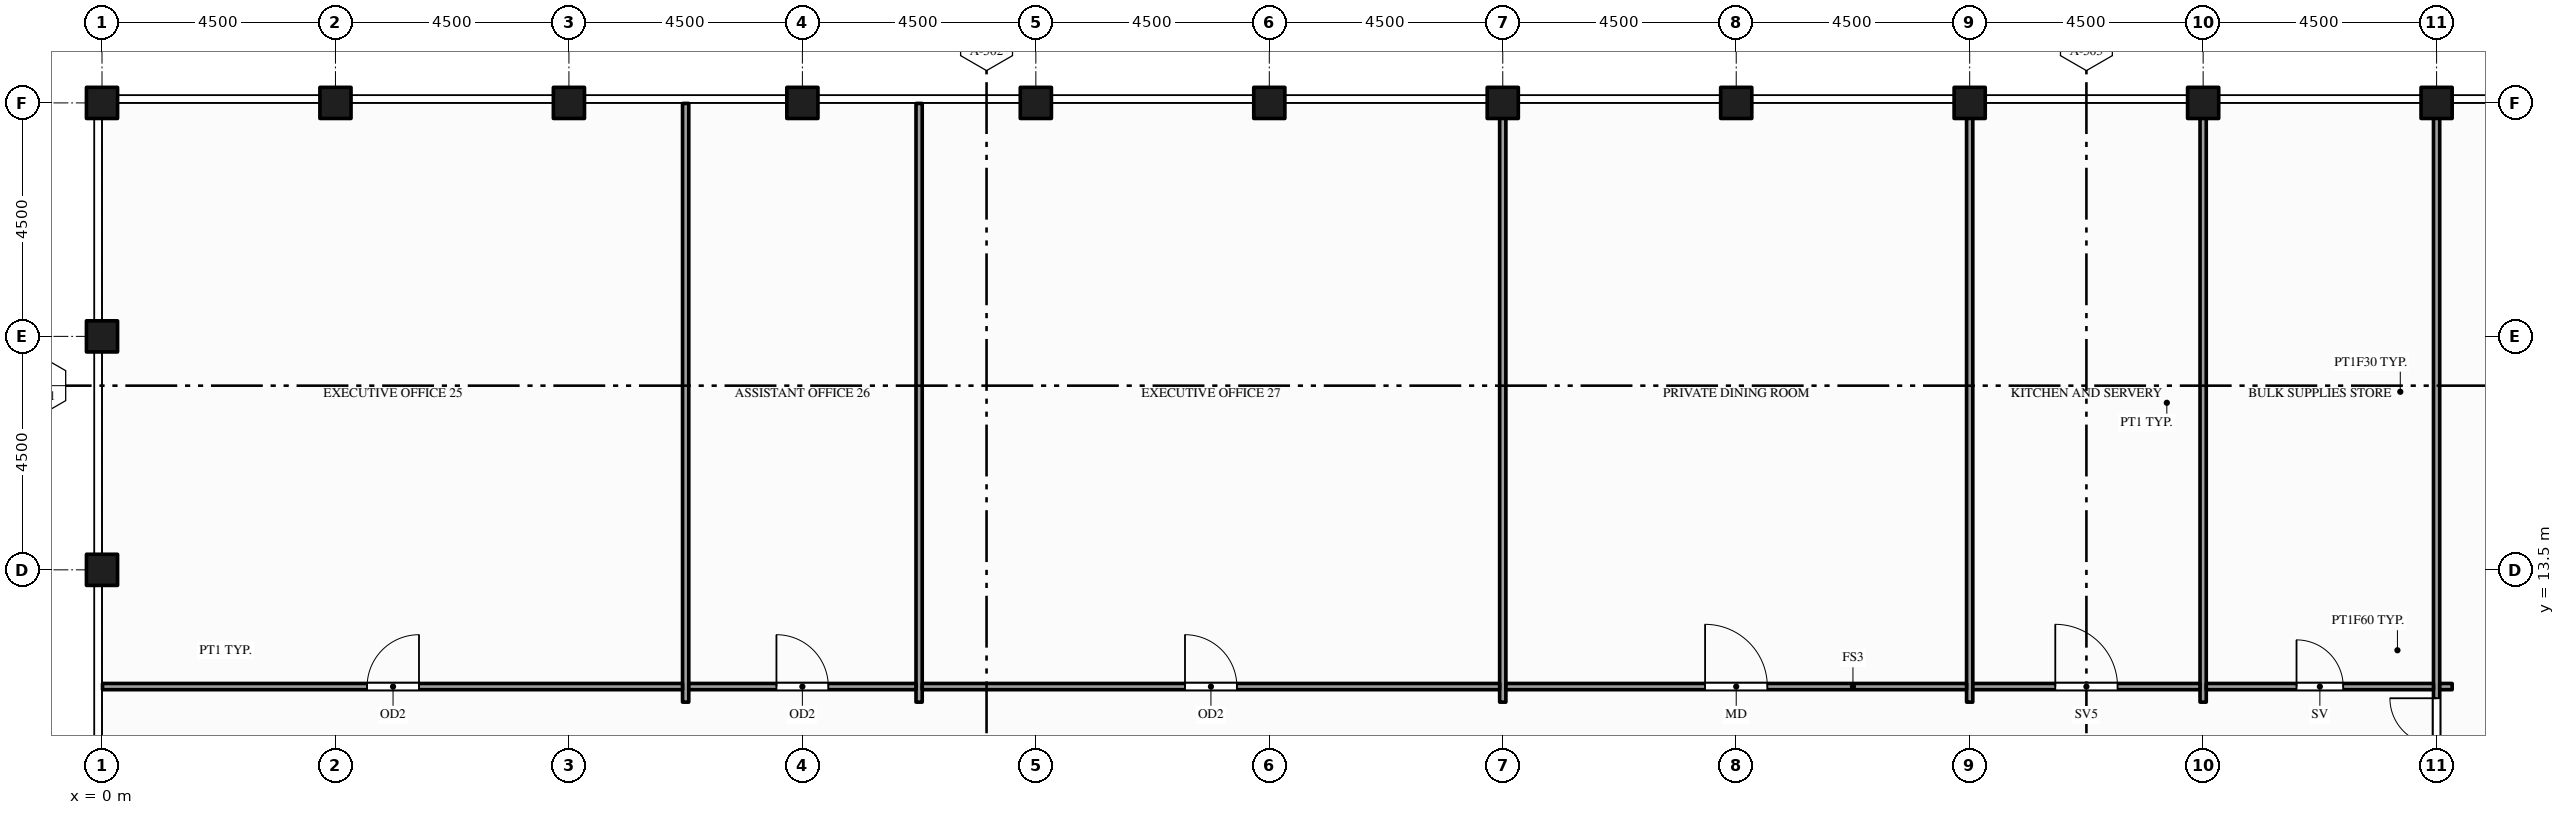
"""IFC4 building model, lengths in metres.
Left out: names, types, materials, properties, quantities, classifications, styles, units other than length and angle.
Written with IfcOpenShell. Run it as: python <this file> out.ifc"""

import sys

from ifc_helpers import new_model, si_unit, direction, frame, frame_2d, origin, origin_2d, place, context, subcontext, project, spatial, rectangle, hollow_rectangle, extrude, element, fill, save


model = new_model("IFC4")
c1 = context("Model", 3, precision=1e-05, world=origin(), true_north=direction((0.0, 1.0)))
c2 = subcontext(c1, "Body", "Model", "MODEL_VIEW")
j1 = project(units=[si_unit("LENGTHUNIT", "METRE"), si_unit("PLANEANGLEUNIT", "RADIAN")], contexts=[c1])
p1 = place(None, origin())
s1 = spatial("IfcSite", under=j1, at=p1, CompositionType="ELEMENT")
p2 = place(p1, origin())
s2 = spatial("IfcBuilding", under=s1, at=p2, CompositionType="ELEMENT")
p3 = place(p2, frame((0.0, 0.0, 305.0)))
s3 = spatial("IfcBuildingStorey", under=s2, at=p3, CompositionType="ELEMENT", Elevation=305.0)
for number, where, z_axis, x_axis in (
    (1, (0.0, 13.5, -0.15), (0.0, 0.0, 1.0), (1.0, 0.0, 0.0)),
    (2, (0.0, 18.0, -0.15), (0.0, 0.0, 1.0), (1.0, 0.0, 0.0)),
    (3, (0.0, 22.5, -0.15), (0.0, 0.0, 1.0), (1.0, 0.0, 0.0)),
    (4, (4.5, 22.5, -0.15), (0.0, 0.0, 1.0), (1.0, 0.0, 0.0)),
    (5, (9.0, 22.5, -0.15), (0.0, 0.0, 1.0), (1.0, 0.0, 0.0)),
    (6, (13.5, 22.5, -0.15), (0.0, 0.0, 1.0), (1.0, 0.0, 0.0)),
    (7, (18.0, 22.5, -0.15), (0.0, 0.0, 1.0), (1.0, 0.0, 0.0)),
    (8, (22.5, 22.5, -0.15), (0.0, 0.0, 1.0), (1.0, 0.0, 0.0)),
    (9, (27.0, 22.5, -0.15), (0.0, 0.0, 1.0), (1.0, 0.0, 0.0)),
    (10, (31.5, 22.5, -0.15), (0.0, 0.0, 1.0), (1.0, 0.0, 0.0)),
    (11, (36.0, 22.5, -0.15), (0.0, 0.0, 1.0), (1.0, 0.0, 0.0)),
    (12, (40.5, 22.5, -0.15), (0.0, 0.0, 1.0), (1.0, 0.0, 0.0)),
    (13, (45.0, 22.5, -0.15), (0.0, 0.0, 1.0), (1.0, 0.0, 0.0)),
):
    element("IfcColumn", number, at=place(p3, frame(where, z_axis=z_axis, x_axis=x_axis)), inside=s3, PredefinedType="COLUMN", context=c2, shape_type="SweptSolid", body=[
        extrude(hollow_rectangle(XDim=0.6, YDim=0.6, WallThickness=0.03, at=origin_2d()), origin(), (0.0, 0.0, 1.0), 4.5),
    ])
for number, where, z_axis, x_axis in (
    (14, (11.25, 10.95, 0.0), (0.0, 0.0, 1.0), (0.0, 1.0, 0.0)),
    (15, (15.75, 10.95, 0.0), (0.0, 0.0, 1.0), (0.0, 1.0, 0.0)),
    (16, (27.0, 10.95, 0.0), (0.0, 0.0, 1.0), (0.0, 1.0, 0.0)),
    (17, (36.0, 10.95, 0.0), (0.0, 0.0, 1.0), (0.0, 1.0, 0.0)),
    (18, (40.5, 10.95, 0.0), (0.0, 0.0, 1.0), (0.0, 1.0, 0.0)),
):
    element("IfcWall", number, at=place(p3, frame(where, z_axis=z_axis, x_axis=x_axis)), inside=s3, PredefinedType="PARTITIONING", context=c2, shape_type="SweptSolid", body=[
        extrude(rectangle(XDim=11.54, YDim=0.12, at=frame_2d((5.77, 0.0))), origin(), (0.0, 0.0, 1.0), 3.359),
    ])
p4 = place(p3, frame((45.0, 0.01, 0.0), z_axis=(0.0, 0.0, 1.0), x_axis=(0.0, 1.0, 0.0)))
e19 = element("IfcWall", 19, at=p4, inside=s3, PredefinedType="PARTITIONING", context=c2, shape_type="SweptSolid", body=[
    extrude(rectangle(XDim=22.48, YDim=0.12, at=frame_2d((11.24, 0.0))), origin(), (0.0, 0.0, 1.0), 3.359),
])
p5 = place(p4, frame((9.215, 0.0, 0.0)))
e20 = element("IfcOpeningElement", 20, at=p5, cuts=e19, PredefinedType="OPENING", context=c2, shape_type="SweptSolid", body=[
    extrude(rectangle(XDim=1.8, YDim=2.1, at=frame_2d((0.9, 1.05))), frame((0.0, 0.07, 0.0), z_axis=(0.0, -1.0, 0.0), x_axis=(1.0, 0.0, 0.0)), (0.0, 0.0, 1.0), 0.14),
])
p6 = place(p4, frame((0.99, 0.0, 0.0)))
e21 = element("IfcOpeningElement", 21, at=p6, cuts=e19, PredefinedType="OPENING", context=c2, shape_type="SweptSolid", body=[
    extrude(rectangle(XDim=0.9, YDim=2.1, at=frame_2d((0.45, 1.05))), frame((0.0, 0.07, 0.0), z_axis=(0.0, -1.0, 0.0), x_axis=(1.0, 0.0, 0.0)), (0.0, 0.0, 1.0), 0.14),
])
p7 = place(p4, frame((4.04, 0.0, 0.0)))
e22 = element("IfcOpeningElement", 22, at=p7, cuts=e19, PredefinedType="OPENING", context=c2, shape_type="SweptSolid", body=[
    extrude(rectangle(XDim=0.9, YDim=2.1, at=frame_2d((0.45, 1.05))), frame((0.0, 0.07, 0.0), z_axis=(0.0, -1.0, 0.0), x_axis=(1.0, 0.0, 0.0)), (0.0, 0.0, 1.0), 0.14),
])
p8 = place(p4, frame((6.99, 0.0, 0.0)))
e23 = element("IfcOpeningElement", 23, at=p8, cuts=e19, PredefinedType="OPENING", context=c2, shape_type="SweptSolid", body=[
    extrude(rectangle(XDim=1.0, YDim=2.1, at=frame_2d((0.5, 1.05))), frame((0.0, 0.07, 0.0), z_axis=(0.0, -1.0, 0.0), x_axis=(1.0, 0.0, 0.0)), (0.0, 0.0, 1.0), 0.14),
])
p9 = place(p3, frame((0.01, 11.25, 0.0), z_axis=(0.0, 0.0, 1.0), x_axis=(1.0, 0.0, 0.0)))
e24 = element("IfcWall", 24, at=p9, inside=s3, PredefinedType="PARTITIONING", context=c2, shape_type="SweptSolid", body=[
    extrude(rectangle(XDim=11.18, YDim=0.12, at=frame_2d((5.59, 0.0))), origin(), (0.0, 0.0, 1.0), 3.359),
])
p10 = place(p9, frame((5.1, 0.0, 0.0)))
e25 = element("IfcOpeningElement", 25, at=p10, cuts=e24, PredefinedType="OPENING", context=c2, shape_type="SweptSolid", body=[
    extrude(rectangle(XDim=1.0, YDim=2.1, at=frame_2d((0.5, 1.05))), frame((0.0, 0.07, 0.0), z_axis=(0.0, -1.0, 0.0), x_axis=(1.0, 0.0, 0.0)), (0.0, 0.0, 1.0), 0.14),
])
p11 = place(p3, frame((11.31, 11.25, 0.0), z_axis=(0.0, 0.0, 1.0), x_axis=(1.0, 0.0, 0.0)))
e26 = element("IfcWall", 26, at=p11, inside=s3, PredefinedType="PARTITIONING", context=c2, shape_type="SweptSolid", body=[
    extrude(rectangle(XDim=4.38, YDim=0.12, at=frame_2d((2.19, 0.0))), origin(), (0.0, 0.0, 1.0), 3.359),
])
p12 = place(p11, frame((1.69, 0.0, 0.0)))
e27 = element("IfcOpeningElement", 27, at=p12, cuts=e26, PredefinedType="OPENING", context=c2, shape_type="SweptSolid", body=[
    extrude(rectangle(XDim=1.0, YDim=2.1, at=frame_2d((0.5, 1.05))), frame((0.0, 0.07, 0.0), z_axis=(0.0, -1.0, 0.0), x_axis=(1.0, 0.0, 0.0)), (0.0, 0.0, 1.0), 0.14),
])
p13 = place(p3, frame((15.81, 11.25, 0.0), z_axis=(0.0, 0.0, 1.0), x_axis=(1.0, 0.0, 0.0)))
e28 = element("IfcWall", 28, at=p13, inside=s3, PredefinedType="PARTITIONING", context=c2, shape_type="SweptSolid", body=[
    extrude(rectangle(XDim=11.13, YDim=0.12, at=frame_2d((5.565, 0.0))), origin(), (0.0, 0.0, 1.0), 3.359),
])
p14 = place(p13, frame((5.065, 0.0, 0.0)))
e29 = element("IfcOpeningElement", 29, at=p14, cuts=e28, PredefinedType="OPENING", context=c2, shape_type="SweptSolid", body=[
    extrude(rectangle(XDim=1.0, YDim=2.1, at=frame_2d((0.5, 1.05))), frame((0.0, 0.07, 0.0), z_axis=(0.0, -1.0, 0.0), x_axis=(1.0, 0.0, 0.0)), (0.0, 0.0, 1.0), 0.14),
])
p15 = place(p3, frame((27.06, 11.25, 0.0), z_axis=(0.0, 0.0, 1.0), x_axis=(1.0, 0.0, 0.0)))
e30 = element("IfcWall", 30, at=p15, inside=s3, PredefinedType="PARTITIONING", context=c2, shape_type="SweptSolid", body=[
    extrude(rectangle(XDim=8.88, YDim=0.12, at=frame_2d((4.44, 0.0))), origin(), (0.0, 0.0, 1.0), 3.359),
])
p16 = place(p15, frame((3.84, 0.0, 0.0)))
e31 = element("IfcOpeningElement", 31, at=p16, cuts=e30, PredefinedType="OPENING", context=c2, shape_type="SweptSolid", body=[
    extrude(rectangle(XDim=1.2, YDim=2.1, at=frame_2d((0.6, 1.05))), frame((0.0, 0.07, 0.0), z_axis=(0.0, -1.0, 0.0), x_axis=(1.0, 0.0, 0.0)), (0.0, 0.0, 1.0), 0.14),
])
p17 = place(p3, frame((36.06, 11.25, 0.0), z_axis=(0.0, 0.0, 1.0), x_axis=(1.0, 0.0, 0.0)))
e32 = element("IfcWall", 32, at=p17, inside=s3, PredefinedType="PARTITIONING", context=c2, shape_type="SweptSolid", body=[
    extrude(rectangle(XDim=4.38, YDim=0.12, at=frame_2d((2.19, 0.0))), origin(), (0.0, 0.0, 1.0), 3.359),
])
p18 = place(p17, frame((1.59, 0.0, 0.0)))
e33 = element("IfcOpeningElement", 33, at=p18, cuts=e32, PredefinedType="OPENING", context=c2, shape_type="SweptSolid", body=[
    extrude(rectangle(XDim=1.2, YDim=2.1, at=frame_2d((0.6, 1.05))), frame((0.0, 0.07, 0.0), z_axis=(0.0, -1.0, 0.0), x_axis=(1.0, 0.0, 0.0)), (0.0, 0.0, 1.0), 0.14),
])
p19 = place(p3, frame((40.56, 11.25, 0.0), z_axis=(0.0, 0.0, 1.0), x_axis=(1.0, 0.0, 0.0)))
e34 = element("IfcWall", 34, at=p19, inside=s3, PredefinedType="PARTITIONING", context=c2, shape_type="SweptSolid", body=[
    extrude(rectangle(XDim=4.38, YDim=0.12, at=frame_2d((2.19, 0.0))), origin(), (0.0, 0.0, 1.0), 3.359),
])
p20 = place(p19, frame((1.74, 0.0, 0.0)))
e35 = element("IfcOpeningElement", 35, at=p20, cuts=e34, PredefinedType="OPENING", context=c2, shape_type="SweptSolid", body=[
    extrude(rectangle(XDim=0.9, YDim=2.1, at=frame_2d((0.45, 1.05))), frame((0.0, 0.07, 0.0), z_axis=(0.0, -1.0, 0.0), x_axis=(1.0, 0.0, 0.0)), (0.0, 0.0, 1.0), 0.14),
])
p21 = place(p3, frame((45.06, 11.25, 0.0), z_axis=(0.0, 0.0, 1.0), x_axis=(1.0, 0.0, 0.0)))
e36 = element("IfcWall", 36, at=p21, inside=s3, PredefinedType="PARTITIONING", context=c2, shape_type="SweptSolid", body=[
    extrude(rectangle(XDim=0.24, YDim=0.12, at=frame_2d((0.12, 0.0))), origin(), (0.0, 0.0, 1.0), 3.359),
])
p22 = place(p5, origin())
e37 = element("IfcDoor", 37, at=p22, inside=s3, OperationType="DOUBLE_DOOR_SINGLE_SWING", PredefinedType="DOOR", context=c2, shape_type="SweptSolid", body=[
    extrude(rectangle(XDim=1.8, YDim=2.1, at=frame_2d((0.9, 1.05))), frame((0.0, 0.025, 0.0), z_axis=(0.0, -1.0, 0.0), x_axis=(1.0, 0.0, 0.0)), (0.0, 0.0, 1.0), 0.05),
])
fill(e20, e37)
p23 = place(p10, origin())
e38 = element("IfcDoor", 38, at=p23, inside=s3, OperationType="SINGLE_SWING_RIGHT", PredefinedType="DOOR", context=c2, shape_type="SweptSolid", body=[
    extrude(rectangle(XDim=1.0, YDim=2.1, at=frame_2d((0.5, 1.05))), frame((0.0, 0.025, 0.0), z_axis=(0.0, -1.0, 0.0), x_axis=(1.0, 0.0, 0.0)), (0.0, 0.0, 1.0), 0.05),
])
fill(e25, e38)
p24 = place(p12, origin())
e39 = element("IfcDoor", 39, at=p24, inside=s3, OperationType="SINGLE_SWING_LEFT", PredefinedType="DOOR", context=c2, shape_type="SweptSolid", body=[
    extrude(rectangle(XDim=1.0, YDim=2.1, at=frame_2d((0.5, 1.05))), frame((0.0, 0.025, 0.0), z_axis=(0.0, -1.0, 0.0), x_axis=(1.0, 0.0, 0.0)), (0.0, 0.0, 1.0), 0.05),
])
fill(e27, e39)
p25 = place(p14, origin())
e40 = element("IfcDoor", 40, at=p25, inside=s3, OperationType="SINGLE_SWING_LEFT", PredefinedType="DOOR", context=c2, shape_type="SweptSolid", body=[
    extrude(rectangle(XDim=1.0, YDim=2.1, at=frame_2d((0.5, 1.05))), frame((0.0, 0.025, 0.0), z_axis=(0.0, -1.0, 0.0), x_axis=(1.0, 0.0, 0.0)), (0.0, 0.0, 1.0), 0.05),
])
fill(e29, e40)
p26 = place(p16, origin())
e41 = element("IfcDoor", 41, at=p26, inside=s3, OperationType="SINGLE_SWING_LEFT", PredefinedType="DOOR", context=c2, shape_type="SweptSolid", body=[
    extrude(rectangle(XDim=1.2, YDim=2.1, at=frame_2d((0.6, 1.05))), frame((0.0, 0.025, 0.0), z_axis=(0.0, -1.0, 0.0), x_axis=(1.0, 0.0, 0.0)), (0.0, 0.0, 1.0), 0.05),
])
fill(e31, e41)
p27 = place(p18, origin())
e42 = element("IfcDoor", 42, at=p27, inside=s3, OperationType="SINGLE_SWING_LEFT", PredefinedType="DOOR", context=c2, shape_type="SweptSolid", body=[
    extrude(rectangle(XDim=1.2, YDim=2.1, at=frame_2d((0.6, 1.05))), frame((0.0, 0.025, 0.0), z_axis=(0.0, -1.0, 0.0), x_axis=(1.0, 0.0, 0.0)), (0.0, 0.0, 1.0), 0.05),
])
fill(e33, e42)
p28 = place(p20, origin())
e43 = element("IfcDoor", 43, at=p28, inside=s3, OperationType="SINGLE_SWING_LEFT", PredefinedType="DOOR", context=c2, shape_type="SweptSolid", body=[
    extrude(rectangle(XDim=0.9, YDim=2.1, at=frame_2d((0.45, 1.05))), frame((0.0, 0.025, 0.0), z_axis=(0.0, -1.0, 0.0), x_axis=(1.0, 0.0, 0.0)), (0.0, 0.0, 1.0), 0.05),
])
fill(e35, e43)
save(model, sys.argv[1])
